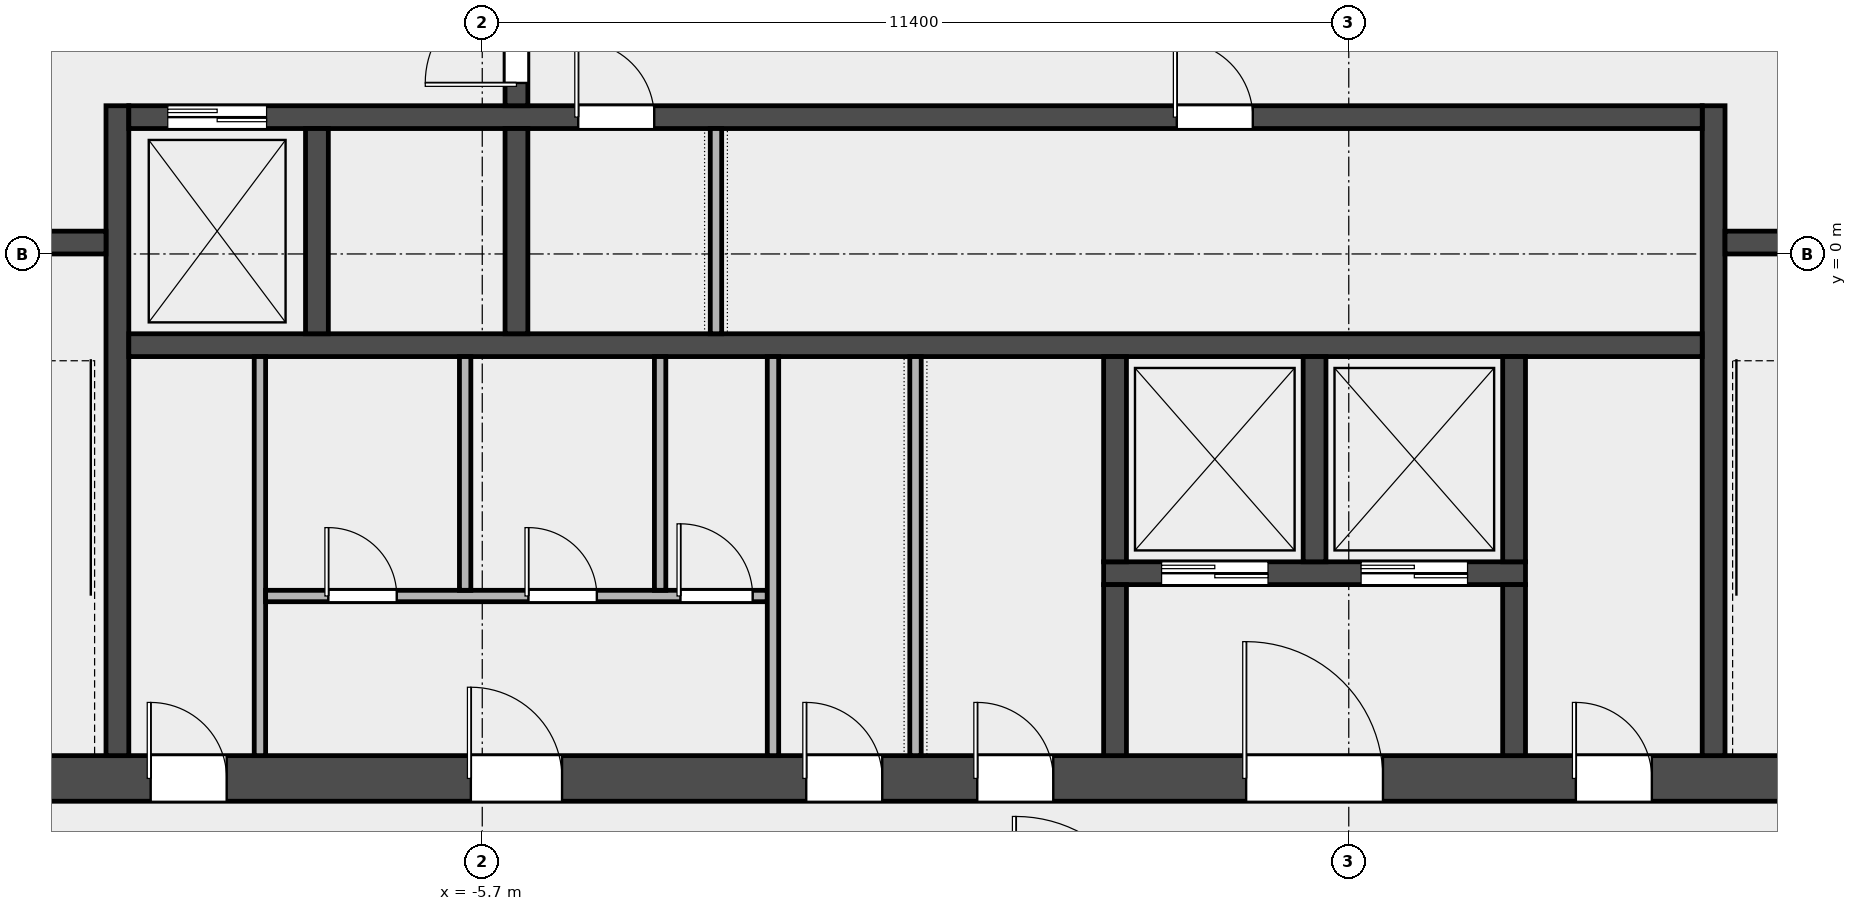
"""IFC4 building model, lengths in metres.
Left out: names, types, materials, properties, quantities, classifications, styles, units other than length and angle.
Written with IfcOpenShell. Run it as: python <this file> out.ifc"""

import sys

from ifc_helpers import new_model, si_unit, direction, frame, frame_2d, origin, place, context, subcontext, project, spatial, rectangle, extrude, element, fill, save


model = new_model("IFC4")
c1 = context("Model", 3, precision=1e-05, world=origin(), true_north=direction((0.0, 1.0)))
c2 = subcontext(c1, "Body", "Model", "MODEL_VIEW")
j1 = project(units=[si_unit("LENGTHUNIT", "METRE"), si_unit("PLANEANGLEUNIT", "RADIAN")], contexts=[c1])
p1 = place(None, origin())
s1 = spatial("IfcSite", under=j1, at=p1, CompositionType="ELEMENT")
p2 = place(p1, origin())
s2 = spatial("IfcBuilding", under=s1, at=p2, CompositionType="ELEMENT")
p3 = place(p2, frame((0.0, 0.0, 243.0)))
s3 = spatial("IfcBuildingStorey", under=s2, at=p3, CompositionType="ELEMENT", Elevation=243.0)
p4 = place(p3, frame((-14.4, -6.9, 0.0), z_axis=(0.0, 0.0, 1.0), x_axis=(1.0, 0.0, 0.0)))
e1 = element("IfcWall", 1, at=p4, inside=s3, PredefinedType="SHEAR", context=c2, shape_type="SweptSolid", body=[
    extrude(rectangle(XDim=28.8, YDim=0.6, at=frame_2d((14.4, 0.0))), origin(), (0.0, 0.0, 1.0), 3.7),
])
p5 = place(p4, frame((4.337, 0.0, 0.0)))
e2 = element("IfcOpeningElement", 2, at=p5, cuts=e1, PredefinedType="OPENING", context=c2, shape_type="SweptSolid", body=[
    extrude(rectangle(XDim=1.0, YDim=2.1, at=frame_2d((0.5, 1.05))), frame((0.0, 0.312, 0.0), z_axis=(0.0, -1.0, 0.0), x_axis=(1.0, 0.0, 0.0)), (0.0, 0.0, 1.0), 0.624),
])
p6 = place(p4, frame((8.55, 0.0, 0.0)))
e3 = element("IfcOpeningElement", 3, at=p6, cuts=e1, PredefinedType="OPENING", context=c2, shape_type="SweptSolid", body=[
    extrude(rectangle(XDim=1.2, YDim=2.1, at=frame_2d((0.6, 1.05))), frame((0.0, 0.312, 0.0), z_axis=(0.0, -1.0, 0.0), x_axis=(1.0, 0.0, 0.0)), (0.0, 0.0, 1.0), 0.624),
])
p7 = place(p4, frame((12.962, 0.0, 0.0)))
e4 = element("IfcOpeningElement", 4, at=p7, cuts=e1, PredefinedType="OPENING", context=c2, shape_type="SweptSolid", body=[
    extrude(rectangle(XDim=1.0, YDim=2.1, at=frame_2d((0.5, 1.05))), frame((0.0, 0.312, 0.0), z_axis=(0.0, -1.0, 0.0), x_axis=(1.0, 0.0, 0.0)), (0.0, 0.0, 1.0), 0.624),
])
p8 = place(p4, frame((15.212, 0.0, 0.0)))
e5 = element("IfcOpeningElement", 5, at=p8, cuts=e1, PredefinedType="OPENING", context=c2, shape_type="SweptSolid", body=[
    extrude(rectangle(XDim=1.0, YDim=2.1, at=frame_2d((0.5, 1.05))), frame((0.0, 0.312, 0.0), z_axis=(0.0, -1.0, 0.0), x_axis=(1.0, 0.0, 0.0)), (0.0, 0.0, 1.0), 0.624),
])
p9 = place(p4, frame((18.75, 0.0, 0.0)))
e6 = element("IfcOpeningElement", 6, at=p9, cuts=e1, PredefinedType="OPENING", context=c2, shape_type="SweptSolid", body=[
    extrude(rectangle(XDim=1.8, YDim=2.1, at=frame_2d((0.9, 1.05))), frame((0.0, 0.312, 0.0), z_axis=(0.0, -1.0, 0.0), x_axis=(1.0, 0.0, 0.0)), (0.0, 0.0, 1.0), 0.624),
])
p10 = place(p4, frame((23.087, 0.0, 0.0)))
e7 = element("IfcOpeningElement", 7, at=p10, cuts=e1, PredefinedType="OPENING", context=c2, shape_type="SweptSolid", body=[
    extrude(rectangle(XDim=1.0, YDim=2.1, at=frame_2d((0.5, 1.05))), frame((0.0, 0.312, 0.0), z_axis=(0.0, -1.0, 0.0), x_axis=(1.0, 0.0, 0.0)), (0.0, 0.0, 1.0), 0.624),
])
for number, where, z_axis, x_axis in (
    (8, (-10.5, -6.6, 0.0), (0.0, 0.0, 1.0), (0.0, 1.0, 0.0)),
    (9, (10.5, -6.6, 0.0), (0.0, 0.0, 1.0), (0.0, 1.0, 0.0)),
):
    element("IfcWall", number, at=place(p3, frame(where, z_axis=z_axis, x_axis=x_axis)), inside=s3, PredefinedType="SHEAR", context=c2, shape_type="SweptSolid", body=[
        extrude(rectangle(XDim=8.55, YDim=0.3, at=frame_2d((4.275, 0.0))), origin(), (0.0, 0.0, 1.0), 3.7),
    ])
p11 = place(p3, frame((-13.8, 0.15, 0.0), z_axis=(0.0, 0.0, 1.0), x_axis=(1.0, 0.0, 0.0)))
e10 = element("IfcWall", 10, at=p11, inside=s3, PredefinedType="SOLIDWALL", context=c2, shape_type="SweptSolid", body=[
    extrude(rectangle(XDim=3.15, YDim=0.3, at=frame_2d((1.575, 0.0))), origin(), (0.0, 0.0, 1.0), 3.7),
])
p12 = place(p11, frame((0.975, 0.0, 0.0)))
e11 = element("IfcOpeningElement", 11, at=p12, cuts=e10, PredefinedType="OPENING", context=c2, shape_type="SweptSolid", body=[
    extrude(rectangle(XDim=1.1, YDim=2.1, at=frame_2d((0.55, 1.05))), frame((0.0, 0.162, 0.0), z_axis=(0.0, -1.0, 0.0), x_axis=(1.0, 0.0, 0.0)), (0.0, 0.0, 1.0), 0.324),
])
p13 = place(p3, frame((10.65, 0.15, 0.0), z_axis=(0.0, 0.0, 1.0), x_axis=(1.0, 0.0, 0.0)))
e12 = element("IfcWall", 12, at=p13, inside=s3, PredefinedType="SOLIDWALL", context=c2, shape_type="SweptSolid", body=[
    extrude(rectangle(XDim=3.15, YDim=0.3, at=frame_2d((1.575, 0.0))), origin(), (0.0, 0.0, 1.0), 3.7),
])
p14 = place(p13, frame((1.025, 0.0, 0.0)))
e13 = element("IfcOpeningElement", 13, at=p14, cuts=e12, PredefinedType="OPENING", context=c2, shape_type="SweptSolid", body=[
    extrude(rectangle(XDim=1.1, YDim=2.1, at=frame_2d((0.55, 1.05))), frame((0.0, 0.162, 0.0), z_axis=(0.0, -1.0, 0.0), x_axis=(1.0, 0.0, 0.0)), (0.0, 0.0, 1.0), 0.324),
])
p15 = place(p3, frame((-10.35, -1.2, 0.0), z_axis=(0.0, 0.0, 1.0), x_axis=(1.0, 0.0, 0.0)))
e14 = element("IfcWall", 14, at=p15, inside=s3, PredefinedType="SOLIDWALL", context=c2, shape_type="SweptSolid", body=[
    extrude(rectangle(XDim=20.7, YDim=0.3, at=frame_2d((10.35, 0.0))), origin(), (0.0, 0.0, 1.0), 3.7),
])
p16 = place(p3, frame((-10.35, 1.8, 0.0), z_axis=(0.0, 0.0, 1.0), x_axis=(1.0, 0.0, 0.0)))
e15 = element("IfcWall", 15, at=p16, inside=s3, PredefinedType="SOLIDWALL", context=c2, shape_type="SweptSolid", body=[
    extrude(rectangle(XDim=20.7, YDim=0.3, at=frame_2d((10.35, 0.0))), origin(), (0.0, 0.0, 1.0), 3.7),
])
p17 = place(p16, frame((0.512, 0.0, 0.0)))
e16 = element("IfcOpeningElement", 16, at=p17, cuts=e15, PredefinedType="OPENING", context=c2, shape_type="SweptSolid", body=[
    extrude(rectangle(XDim=1.3, YDim=2.1, at=frame_2d((0.65, 1.05))), frame((0.0, 0.162, 0.0), z_axis=(0.0, -1.0, 0.0), x_axis=(1.0, 0.0, 0.0)), (0.0, 0.0, 1.0), 0.324),
])
p18 = place(p16, frame((5.913, 0.0, 0.0)))
e17 = element("IfcOpeningElement", 17, at=p18, cuts=e15, PredefinedType="OPENING", context=c2, shape_type="SweptSolid", body=[
    extrude(rectangle(XDim=1.0, YDim=2.1, at=frame_2d((0.5, 1.05))), frame((0.0, 0.162, 0.0), z_axis=(0.0, -1.0, 0.0), x_axis=(1.0, 0.0, 0.0)), (0.0, 0.0, 1.0), 0.324),
])
p19 = place(p16, frame((13.788, 0.0, 0.0)))
e18 = element("IfcOpeningElement", 18, at=p19, cuts=e15, PredefinedType="OPENING", context=c2, shape_type="SweptSolid", body=[
    extrude(rectangle(XDim=1.0, YDim=2.1, at=frame_2d((0.5, 1.05))), frame((0.0, 0.162, 0.0), z_axis=(0.0, -1.0, 0.0), x_axis=(1.0, 0.0, 0.0)), (0.0, 0.0, 1.0), 0.324),
])
for number, where, z_axis, x_axis in (
    (19, (-7.875, -1.05, 0.0), (0.0, 0.0, 1.0), (0.0, 1.0, 0.0)),
    (20, (-5.25, -1.05, 0.0), (0.0, 0.0, 1.0), (0.0, 1.0, 0.0)),
):
    element("IfcWall", number, at=place(p3, frame(where, z_axis=z_axis, x_axis=x_axis)), inside=s3, PredefinedType="SOLIDWALL", context=c2, shape_type="SweptSolid", body=[
        extrude(rectangle(XDim=2.7, YDim=0.3, at=frame_2d((1.35, 0.0))), origin(), (0.0, 0.0, 1.0), 3.7),
    ])
p20 = place(p3, frame((-5.25, 1.95, 0.0), z_axis=(0.0, 0.0, 1.0), x_axis=(0.0, 1.0, 0.0)))
e21 = element("IfcWall", 21, at=p20, inside=s3, PredefinedType="SOLIDWALL", context=c2, shape_type="SweptSolid", body=[
    extrude(rectangle(XDim=3.3, YDim=0.3, at=frame_2d((1.65, 0.0))), origin(), (0.0, 0.0, 1.0), 3.7),
])
p21 = place(p20, frame((0.3, 0.0, 0.0)))
e22 = element("IfcOpeningElement", 22, at=p21, cuts=e21, PredefinedType="OPENING", context=c2, shape_type="SweptSolid", body=[
    extrude(rectangle(XDim=1.2, YDim=2.1, at=frame_2d((0.6, 1.05))), frame((0.0, 0.162, 0.0), z_axis=(0.0, -1.0, 0.0), x_axis=(1.0, 0.0, 0.0)), (0.0, 0.0, 1.0), 0.324),
])
p22 = place(p20, frame((1.8, 0.0, 0.0)))
e23 = element("IfcOpeningElement", 23, at=p22, cuts=e21, PredefinedType="OPENING", context=c2, shape_type="SweptSolid", body=[
    extrude(rectangle(XDim=1.2, YDim=2.1, at=frame_2d((0.6, 1.05))), frame((0.0, 0.162, 0.0), z_axis=(0.0, -1.0, 0.0), x_axis=(1.0, 0.0, 0.0)), (0.0, 0.0, 1.0), 0.324),
])
p23 = place(p3, frame((2.475, -4.2, 0.0), z_axis=(0.0, 0.0, 1.0), x_axis=(1.0, 0.0, 0.0)))
e24 = element("IfcWall", 24, at=p23, inside=s3, PredefinedType="SOLIDWALL", context=c2, shape_type="SweptSolid", body=[
    extrude(rectangle(XDim=5.55, YDim=0.3, at=frame_2d((2.775, 0.0))), origin(), (0.0, 0.0, 1.0), 3.7),
])
p24 = place(p23, frame((0.762, 0.0, 0.0)))
e25 = element("IfcOpeningElement", 25, at=p24, cuts=e24, PredefinedType="OPENING", context=c2, shape_type="SweptSolid", body=[
    extrude(rectangle(XDim=1.4, YDim=2.1, at=frame_2d((0.7, 1.05))), frame((0.0, 0.162, 0.0), z_axis=(0.0, -1.0, 0.0), x_axis=(1.0, 0.0, 0.0)), (0.0, 0.0, 1.0), 0.324),
])
p25 = place(p23, frame((3.387, 0.0, 0.0)))
e26 = element("IfcOpeningElement", 26, at=p25, cuts=e24, PredefinedType="OPENING", context=c2, shape_type="SweptSolid", body=[
    extrude(rectangle(XDim=1.4, YDim=2.1, at=frame_2d((0.7, 1.05))), frame((0.0, 0.162, 0.0), z_axis=(0.0, -1.0, 0.0), x_axis=(1.0, 0.0, 0.0)), (0.0, 0.0, 1.0), 0.324),
])
p26 = place(p3, frame((2.625, -4.05, 0.0), z_axis=(0.0, 0.0, 1.0), x_axis=(0.0, 1.0, 0.0)))
e27 = element("IfcWall", 27, at=p26, inside=s3, PredefinedType="SOLIDWALL", context=c2, shape_type="SweptSolid", body=[
    extrude(rectangle(XDim=2.7, YDim=0.3, at=frame_2d((1.35, 0.0))), origin(), (0.0, 0.0, 1.0), 3.7),
])
p27 = place(p3, frame((2.625, -6.6, 0.0), z_axis=(0.0, 0.0, 1.0), x_axis=(0.0, 1.0, 0.0)))
e28 = element("IfcWall", 28, at=p27, inside=s3, PredefinedType="SOLIDWALL", context=c2, shape_type="SweptSolid", body=[
    extrude(rectangle(XDim=2.25, YDim=0.3, at=frame_2d((1.125, 0.0))), origin(), (0.0, 0.0, 1.0), 3.7),
])
for number, where, z_axis, x_axis in (
    (29, (5.25, -4.05, 0.0), (0.0, 0.0, 1.0), (0.0, 1.0, 0.0)),
    (30, (7.875, -4.05, 0.0), (0.0, 0.0, 1.0), (0.0, 1.0, 0.0)),
):
    element("IfcWall", number, at=place(p3, frame(where, z_axis=z_axis, x_axis=x_axis)), inside=s3, PredefinedType="SOLIDWALL", context=c2, shape_type="SweptSolid", body=[
        extrude(rectangle(XDim=2.7, YDim=0.3, at=frame_2d((1.35, 0.0))), origin(), (0.0, 0.0, 1.0), 3.7),
    ])
p28 = place(p3, frame((7.875, -6.6, 0.0), z_axis=(0.0, 0.0, 1.0), x_axis=(0.0, 1.0, 0.0)))
e31 = element("IfcWall", 31, at=p28, inside=s3, PredefinedType="SOLIDWALL", context=c2, shape_type="SweptSolid", body=[
    extrude(rectangle(XDim=2.25, YDim=0.3, at=frame_2d((1.125, 0.0))), origin(), (0.0, 0.0, 1.0), 3.7),
])
p29 = place(p3, frame((-8.625, -6.6, 0.0), z_axis=(0.0, 0.0, 1.0), x_axis=(0.0, 1.0, 0.0)))
e32 = element("IfcWall", 32, at=p29, inside=s3, PredefinedType="PARTITIONING", context=c2, shape_type="SweptSolid", body=[
    extrude(rectangle(XDim=5.25, YDim=0.15, at=frame_2d((2.625, 0.0))), origin(), (0.0, 0.0, 1.0), 3.7),
])
p30 = place(p3, frame((-8.55, -4.5, 0.0), z_axis=(0.0, 0.0, 1.0), x_axis=(1.0, 0.0, 0.0)))
e33 = element("IfcWall", 33, at=p30, inside=s3, PredefinedType="PARTITIONING", context=c2, shape_type="SweptSolid", body=[
    extrude(rectangle(XDim=6.6, YDim=0.15, at=frame_2d((3.3, 0.0))), origin(), (0.0, 0.0, 1.0), 3.7),
])
p31 = place(p30, frame((0.825, 0.0, 0.0)))
e34 = element("IfcOpeningElement", 34, at=p31, cuts=e33, PredefinedType="OPENING", context=c2, shape_type="SweptSolid", body=[
    extrude(rectangle(XDim=0.9, YDim=2.1, at=frame_2d((0.45, 1.05))), frame((0.0, 0.087, 0.0), z_axis=(0.0, -1.0, 0.0), x_axis=(1.0, 0.0, 0.0)), (0.0, 0.0, 1.0), 0.174),
])
p32 = place(p30, frame((3.458, 0.0, 0.0)))
e35 = element("IfcOpeningElement", 35, at=p32, cuts=e33, PredefinedType="OPENING", context=c2, shape_type="SweptSolid", body=[
    extrude(rectangle(XDim=0.9, YDim=2.1, at=frame_2d((0.45, 1.05))), frame((0.0, 0.087, 0.0), z_axis=(0.0, -1.0, 0.0), x_axis=(1.0, 0.0, 0.0)), (0.0, 0.0, 1.0), 0.174),
])
p33 = place(p30, frame((5.458, 0.0, 0.0)))
e36 = element("IfcOpeningElement", 36, at=p33, cuts=e33, PredefinedType="OPENING", context=c2, shape_type="SweptSolid", body=[
    extrude(rectangle(XDim=0.95, YDim=2.1, at=frame_2d((0.475, 1.05))), frame((0.0, 0.087, 0.0), z_axis=(0.0, -1.0, 0.0), x_axis=(1.0, 0.0, 0.0)), (0.0, 0.0, 1.0), 0.174),
])
for number, where, z_axis, x_axis in (
    (37, (-5.925, -4.425, 0.0), (0.0, 0.0, 1.0), (0.0, 1.0, 0.0)),
    (38, (-3.36, -4.425, 0.0), (0.0, 0.0, 1.0), (0.0, 1.0, 0.0)),
):
    element("IfcWall", number, at=place(p3, frame(where, z_axis=z_axis, x_axis=x_axis)), inside=s3, PredefinedType="PARTITIONING", context=c2, shape_type="SweptSolid", body=[
        extrude(rectangle(XDim=3.075, YDim=0.15, at=frame_2d((1.538, 0.0))), origin(), (0.0, 0.0, 1.0), 3.7),
    ])
for number, where, z_axis, x_axis in (
    (39, (-1.875, -6.6, 0.0), (0.0, 0.0, 1.0), (0.0, 1.0, 0.0)),
    (40, (0.0, -6.6, 0.0), (0.0, 0.0, 1.0), (0.0, 1.0, 0.0)),
):
    element("IfcWall", number, at=place(p3, frame(where, z_axis=z_axis, x_axis=x_axis)), inside=s3, PredefinedType="PARTITIONING", context=c2, shape_type="SweptSolid", body=[
        extrude(rectangle(XDim=5.25, YDim=0.15, at=frame_2d((2.625, 0.0))), origin(), (0.0, 0.0, 1.0), 3.7),
    ])
p34 = place(p3, frame((-2.625, -1.05, 0.0), z_axis=(0.0, 0.0, 1.0), x_axis=(0.0, 1.0, 0.0)))
e41 = element("IfcWall", 41, at=p34, inside=s3, PredefinedType="PARTITIONING", context=c2, shape_type="SweptSolid", body=[
    extrude(rectangle(XDim=2.7, YDim=0.15, at=frame_2d((1.35, 0.0))), origin(), (0.0, 0.0, 1.0), 3.7),
])
p35 = place(p21, origin())
e42 = element("IfcDoor", 42, at=p35, inside=s3, OperationType="SINGLE_SWING_LEFT", PredefinedType="DOOR", context=c2, shape_type="SweptSolid", body=[
    extrude(rectangle(XDim=1.2, YDim=2.1, at=frame_2d((0.6, 1.05))), frame((0.0, 0.025, 0.0), z_axis=(0.0, -1.0, 0.0), x_axis=(1.0, 0.0, 0.0)), (0.0, 0.0, 1.0), 0.05),
])
fill(e22, e42)
p36 = place(p17, origin())
e43 = element("IfcDoor", 43, at=p36, inside=s3, OperationType="DOUBLE_DOOR_SLIDING", PredefinedType="DOOR", context=c2, shape_type="SweptSolid", body=[
    extrude(rectangle(XDim=1.3, YDim=2.1, at=frame_2d((0.65, 1.05))), frame((0.0, 0.025, 0.0), z_axis=(0.0, -1.0, 0.0), x_axis=(1.0, 0.0, 0.0)), (0.0, 0.0, 1.0), 0.05),
])
fill(e16, e43)
p37 = place(p24, origin())
e44 = element("IfcDoor", 44, at=p37, inside=s3, OperationType="DOUBLE_DOOR_SLIDING", PredefinedType="DOOR", context=c2, shape_type="SweptSolid", body=[
    extrude(rectangle(XDim=1.4, YDim=2.1, at=frame_2d((0.7, 1.05))), frame((0.0, 0.025, 0.0), z_axis=(0.0, -1.0, 0.0), x_axis=(1.0, 0.0, 0.0)), (0.0, 0.0, 1.0), 0.05),
])
fill(e25, e44)
p38 = place(p25, origin())
e45 = element("IfcDoor", 45, at=p38, inside=s3, OperationType="DOUBLE_DOOR_SLIDING", PredefinedType="DOOR", context=c2, shape_type="SweptSolid", body=[
    extrude(rectangle(XDim=1.4, YDim=2.1, at=frame_2d((0.7, 1.05))), frame((0.0, 0.025, 0.0), z_axis=(0.0, -1.0, 0.0), x_axis=(1.0, 0.0, 0.0)), (0.0, 0.0, 1.0), 0.05),
])
fill(e26, e45)
p39 = place(p5, origin())
e46 = element("IfcDoor", 46, at=p39, inside=s3, OperationType="SINGLE_SWING_LEFT", PredefinedType="DOOR", context=c2, shape_type="SweptSolid", body=[
    extrude(rectangle(XDim=1.0, YDim=2.1, at=frame_2d((0.5, 1.05))), frame((0.0, 0.025, 0.0), z_axis=(0.0, -1.0, 0.0), x_axis=(1.0, 0.0, 0.0)), (0.0, 0.0, 1.0), 0.05),
])
fill(e2, e46)
p40 = place(p6, origin())
e47 = element("IfcDoor", 47, at=p40, inside=s3, OperationType="SINGLE_SWING_LEFT", PredefinedType="DOOR", context=c2, shape_type="SweptSolid", body=[
    extrude(rectangle(XDim=1.2, YDim=2.1, at=frame_2d((0.6, 1.05))), frame((0.0, 0.025, 0.0), z_axis=(0.0, -1.0, 0.0), x_axis=(1.0, 0.0, 0.0)), (0.0, 0.0, 1.0), 0.05),
])
fill(e3, e47)
p41 = place(p31, origin())
e48 = element("IfcDoor", 48, at=p41, inside=s3, OperationType="SINGLE_SWING_LEFT", PredefinedType="DOOR", context=c2, shape_type="SweptSolid", body=[
    extrude(rectangle(XDim=0.9, YDim=2.1, at=frame_2d((0.45, 1.05))), frame((0.0, 0.025, 0.0), z_axis=(0.0, -1.0, 0.0), x_axis=(1.0, 0.0, 0.0)), (0.0, 0.0, 1.0), 0.05),
])
fill(e34, e48)
p42 = place(p32, origin())
e49 = element("IfcDoor", 49, at=p42, inside=s3, OperationType="SINGLE_SWING_LEFT", PredefinedType="DOOR", context=c2, shape_type="SweptSolid", body=[
    extrude(rectangle(XDim=0.9, YDim=2.1, at=frame_2d((0.45, 1.05))), frame((0.0, 0.025, 0.0), z_axis=(0.0, -1.0, 0.0), x_axis=(1.0, 0.0, 0.0)), (0.0, 0.0, 1.0), 0.05),
])
fill(e35, e49)
p43 = place(p33, origin())
e50 = element("IfcDoor", 50, at=p43, inside=s3, OperationType="SINGLE_SWING_LEFT", PredefinedType="DOOR", context=c2, shape_type="SweptSolid", body=[
    extrude(rectangle(XDim=0.95, YDim=2.1, at=frame_2d((0.475, 1.05))), frame((0.0, 0.025, 0.0), z_axis=(0.0, -1.0, 0.0), x_axis=(1.0, 0.0, 0.0)), (0.0, 0.0, 1.0), 0.05),
])
fill(e36, e50)
p44 = place(p7, origin())
e51 = element("IfcDoor", 51, at=p44, inside=s3, OperationType="SINGLE_SWING_LEFT", PredefinedType="DOOR", context=c2, shape_type="SweptSolid", body=[
    extrude(rectangle(XDim=1.0, YDim=2.1, at=frame_2d((0.5, 1.05))), frame((0.0, 0.025, 0.0), z_axis=(0.0, -1.0, 0.0), x_axis=(1.0, 0.0, 0.0)), (0.0, 0.0, 1.0), 0.05),
])
fill(e4, e51)
p45 = place(p8, origin())
e52 = element("IfcDoor", 52, at=p45, inside=s3, OperationType="SINGLE_SWING_LEFT", PredefinedType="DOOR", context=c2, shape_type="SweptSolid", body=[
    extrude(rectangle(XDim=1.0, YDim=2.1, at=frame_2d((0.5, 1.05))), frame((0.0, 0.025, 0.0), z_axis=(0.0, -1.0, 0.0), x_axis=(1.0, 0.0, 0.0)), (0.0, 0.0, 1.0), 0.05),
])
fill(e5, e52)
p46 = place(p9, origin())
e53 = element("IfcDoor", 53, at=p46, inside=s3, OperationType="DOUBLE_DOOR_SINGLE_SWING", PredefinedType="DOOR", context=c2, shape_type="SweptSolid", body=[
    extrude(rectangle(XDim=1.8, YDim=2.1, at=frame_2d((0.9, 1.05))), frame((0.0, 0.025, 0.0), z_axis=(0.0, -1.0, 0.0), x_axis=(1.0, 0.0, 0.0)), (0.0, 0.0, 1.0), 0.05),
])
fill(e6, e53)
p47 = place(p10, origin())
e54 = element("IfcDoor", 54, at=p47, inside=s3, OperationType="SINGLE_SWING_LEFT", PredefinedType="DOOR", context=c2, shape_type="SweptSolid", body=[
    extrude(rectangle(XDim=1.0, YDim=2.1, at=frame_2d((0.5, 1.05))), frame((0.0, 0.025, 0.0), z_axis=(0.0, -1.0, 0.0), x_axis=(1.0, 0.0, 0.0)), (0.0, 0.0, 1.0), 0.05),
])
fill(e7, e54)
p48 = place(p18, origin())
e55 = element("IfcDoor", 55, at=p48, inside=s3, OperationType="SINGLE_SWING_LEFT", PredefinedType="DOOR", context=c2, shape_type="SweptSolid", body=[
    extrude(rectangle(XDim=1.0, YDim=2.1, at=frame_2d((0.5, 1.05))), frame((0.0, 0.025, 0.0), z_axis=(0.0, -1.0, 0.0), x_axis=(1.0, 0.0, 0.0)), (0.0, 0.0, 1.0), 0.05),
])
fill(e17, e55)
p49 = place(p19, origin())
e56 = element("IfcDoor", 56, at=p49, inside=s3, OperationType="SINGLE_SWING_LEFT", PredefinedType="DOOR", context=c2, shape_type="SweptSolid", body=[
    extrude(rectangle(XDim=1.0, YDim=2.1, at=frame_2d((0.5, 1.05))), frame((0.0, 0.025, 0.0), z_axis=(0.0, -1.0, 0.0), x_axis=(1.0, 0.0, 0.0)), (0.0, 0.0, 1.0), 0.05),
])
fill(e18, e56)
save(model, sys.argv[1])
